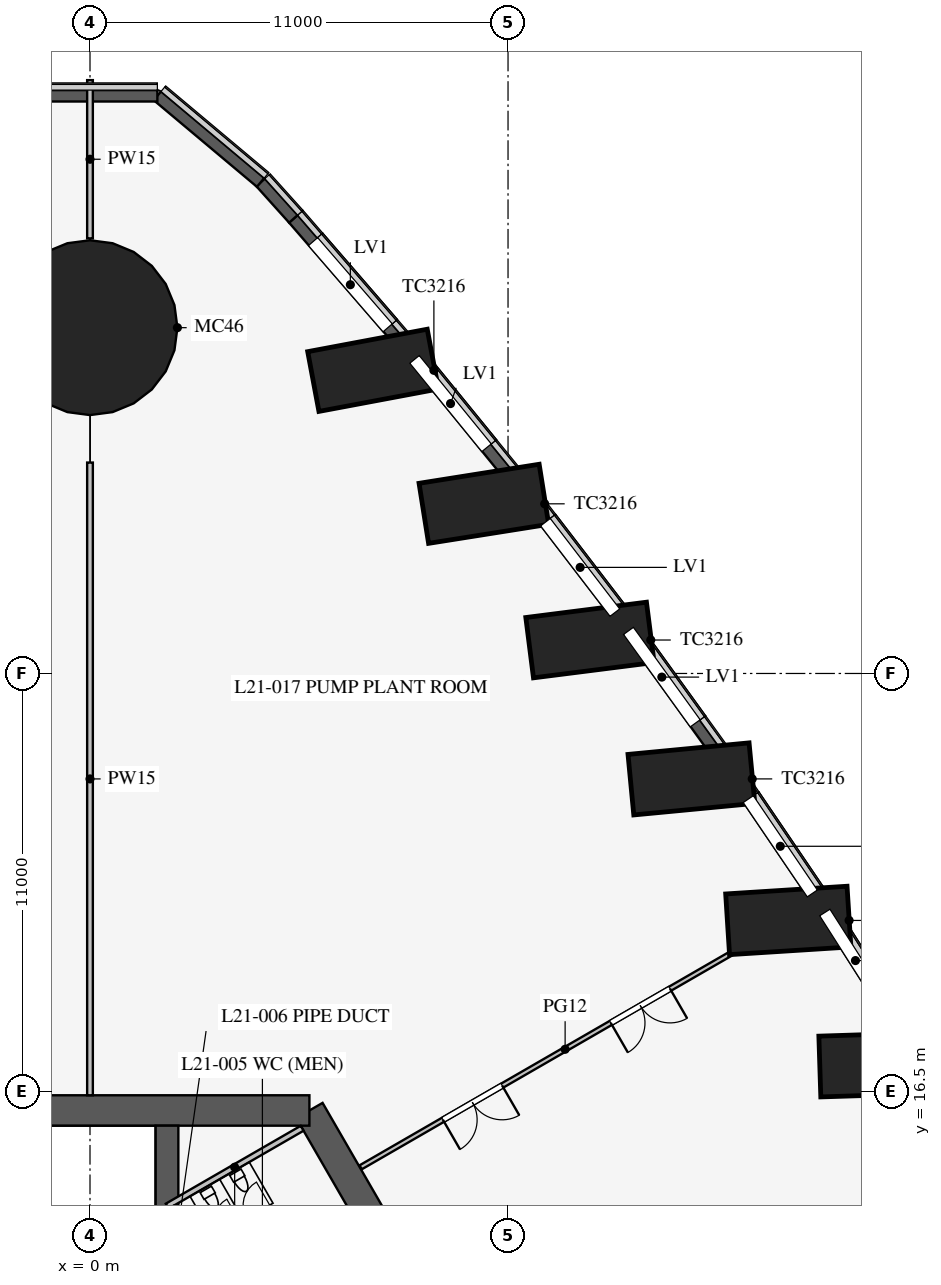
"""IFC4 building model, lengths in metres.
Left out: names, types, materials, properties, quantities, classifications, styles, units other than length and angle.
Written with IfcOpenShell. Run it as: python <this file> out.ifc"""

import sys

from ifc_helpers import new_model, si_unit, direction, frame, frame_2d, origin, origin_2d, place, context, subcontext, project, spatial, polyline, rectangle, circle, outline, extrude, clip, halfspace, element, fill, save


model = new_model("IFC4")
c1 = context("Model", 3, precision=1e-05, world=origin(), true_north=direction((0.0, 1.0)))
c2 = subcontext(c1, "Body", "Model", "MODEL_VIEW")
j1 = project(units=[si_unit("LENGTHUNIT", "METRE"), si_unit("PLANEANGLEUNIT", "RADIAN")], contexts=[c1])
p1 = place(None, origin())
s1 = spatial("IfcSite", under=j1, at=p1, CompositionType="ELEMENT")
p2 = place(p1, origin())
s2 = spatial("IfcBuilding", under=s1, at=p2, CompositionType="ELEMENT")
p3 = place(p2, frame((0.0, 0.0, 92.1)))
s3 = spatial("IfcBuildingStorey", under=s2, at=p3, CompositionType="ELEMENT", Elevation=92.1)
p4 = place(p3, frame((21.031, 17.339, 0.0), z_axis=(-0.185417945913, -0.107037626655, 0.976812741427), x_axis=(-0.526586350374, 0.850094417042, -0.006804242326)))
e1 = element("IfcColumn", 1, at=p4, inside=s3, PredefinedType="COLUMN", context=c2, shape_type="Clipping", body=[
    clip(clip(extrude(rectangle(XDim=3.2, YDim=1.6, at=origin_2d()), origin(), (0.0, 0.0, 1.0), 6.142), halfspace(frame((0.0, 0.0, 0.187), z_axis=(-1.1842135642686942e-05, -5.278007838949161e-06, 0.9999999999159532), x_axis=(0.0, 0.9999999999860714, 5.278007839319245e-06)), True)), halfspace(frame((0.0, 0.0, 5.955), z_axis=(1.1842135642686942e-05, 5.278007838949161e-06, -0.9999999999159532), x_axis=(0.0, -0.9999999999860714, -5.278007839319245e-06)), True)),
])
p5 = place(p3, frame((18.611, 21.137, 0.0), z_axis=(-0.191886340443, -0.110783015409, 0.975144479474), x_axis=(-0.552576194945, 0.833343769153, -0.014060981253)))
e2 = element("IfcColumn", 2, at=p5, inside=s3, PredefinedType="COLUMN", context=c2, shape_type="Clipping", body=[
    clip(clip(extrude(rectangle(XDim=3.2, YDim=1.6, at=origin_2d()), origin(), (0.0, 0.0, 1.0), 6.153), halfspace(frame((0.0, 0.0, 0.205), z_axis=(-3.711813696356814e-06, -2.269742593100088e-05, 0.9999999997355247), x_axis=(0.0, 0.9999999997424135, 2.269742593115724e-05)), True)), halfspace(frame((0.0, 0.0, 5.947), z_axis=(3.711813696356814e-06, 2.269742593100088e-05, -0.9999999997355247), x_axis=(0.0, -0.9999999997424135, -2.269742593115724e-05)), True)),
])
p6 = place(p3, frame((16.076, 24.87, 0.0), z_axis=(-0.20262976704, -0.116980910023, 0.972243099332), x_axis=(-0.577645682079, 0.81598540612, -0.022209974679)))
e3 = element("IfcColumn", 3, at=p6, inside=s3, PredefinedType="COLUMN", context=c2, shape_type="Clipping", body=[
    clip(clip(extrude(rectangle(XDim=3.2, YDim=1.6, at=origin_2d()), origin(), (0.0, 0.0, 1.0), 6.171), halfspace(frame((0.0, 0.0, 0.229), z_axis=(-6.6490654311614225e-06, -1.841628814169827e-06, 0.9999999999761991), x_axis=(0.0, 0.9999999999983042, 1.8416288142105364e-06)), True)), halfspace(frame((0.0, 0.0, 5.942), z_axis=(6.6490654311614225e-06, 1.841628814169827e-06, -0.9999999999761991), x_axis=(0.0, -0.9999999999983042, -1.8416288142105364e-06)), True)),
])
p7 = place(p3, frame((13.426, 28.536, 0.0), z_axis=(-0.217636836674, -0.125674836379, 0.967904976133), x_axis=(-0.601725651442, 0.798074459643, -0.031676446499)))
e4 = element("IfcColumn", 4, at=p7, inside=s3, PredefinedType="COLUMN", context=c2, shape_type="Clipping", body=[
    clip(clip(extrude(rectangle(XDim=3.2, YDim=1.6, at=origin_2d()), origin(), (0.0, 0.0, 1.0), 6.199), halfspace(frame((0.0, 0.0, 0.259), z_axis=(2.1942927783215323e-05, 2.0499894571701646e-05, 0.9999999995491311), x_axis=(0.0, 0.9999999997898772, -2.0499894576636914e-05)), True)), halfspace(frame((0.0, 0.0, 5.939), z_axis=(-2.1942927783215323e-05, -2.0499894571701646e-05, -0.9999999995491311), x_axis=(0.0, -0.9999999997898772, 2.0499894576636914e-05)), True)),
])
p8 = place(p3, frame((10.66, 32.135, 0.0), z_axis=(-0.236939319597, -0.136786078955, 0.961846831586), x_axis=(-0.624285377749, 0.780019899069, -0.042857020249)))
e5 = element("IfcColumn", 5, at=p8, inside=s3, PredefinedType="COLUMN", context=c2, shape_type="Clipping", body=[
    clip(clip(extrude(rectangle(XDim=3.2, YDim=1.6, at=origin_2d()), origin(), (0.0, 0.0, 1.0), 6.238), halfspace(frame((0.0, 0.0, 0.297), z_axis=(-6.818020812683623e-06, 1.7282144695263124e-05, 0.9999999998274212), x_axis=(0.0, 0.9999999998506638, -1.7282144695664807e-05)), True)), halfspace(frame((0.0, 0.0, 5.941), z_axis=(6.818020812683623e-06, -1.7282144695263124e-05, -0.9999999998274212), x_axis=(0.0, -0.9999999998506638, 1.7282144695664807e-05)), True)),
])
p9 = place(p3, frame((7.776, 35.667, 0.0), z_axis=(-0.260253003307, -0.150307169968, 0.953769431742), x_axis=(-0.643899329697, 0.763098944981, -0.055440539186)))
e6 = element("IfcColumn", 6, at=p9, inside=s3, PredefinedType="COLUMN", context=c2, shape_type="Clipping", body=[
    clip(clip(extrude(rectangle(XDim=3.2, YDim=1.6, at=origin_2d()), origin(), (0.0, 0.0, 1.0), 6.291), halfspace(frame((0.0, 0.0, 0.342), z_axis=(4.541465322707716e-05, 7.087809625216934e-06, 0.9999999989436362), x_axis=(0.0, 0.9999999999748815, -7.087809632526204e-06)), True)), halfspace(frame((0.0, 0.0, 5.949), z_axis=(-4.541465322707716e-05, -7.087809625216934e-06, -0.9999999989436362), x_axis=(0.0, -0.9999999999748815, 7.087809632526204e-06)), True)),
])
p10 = place(p3, frame((0.0, 37.0, 0.0), z_axis=(0.0, -0.316227766017, 0.948683298051), x_axis=(1.0, 0.0, 0.0)))
e7 = element("IfcColumn", 7, at=p10, inside=s3, PredefinedType="COLUMN", context=c2, shape_type="Clipping", body=[
    clip(clip(extrude(circle(Radius=2.3, at=origin_2d()), origin(), (0.0, 0.0, 1.0), 6.324), halfspace(frame((0.0, 0.0, 0.768), z_axis=(0.0, 0.0, 1.0), x_axis=(0.0, 1.0, 0.0)), True)), halfspace(frame((0.0, 0.0, 5.557), z_axis=(0.0, 0.0, -1.0), x_axis=(0.0, -1.0, 0.0)), True)),
])
p11 = place(p3, frame((16.743, -3.0, 0.0), z_axis=(0.0, 0.0, 1.0), x_axis=(-0.500002442456, 0.866023993627, 0.0)))
e8 = element("IfcWall", 8, at=p11, inside=s3, PredefinedType="SHEAR", context=c2, shape_type="SweptSolid", body=[
    extrude(rectangle(XDim=21.939, YDim=0.8, at=frame_2d((10.97, 0.0))), origin(), (0.0, 0.0, 1.0), 6.0),
])
p12 = place(p11, frame((17.27, 0.0, 0.0)))
e9 = element("IfcOpeningElement", 9, at=p12, cuts=e8, PredefinedType="OPENING", context=c2, shape_type="SweptSolid", body=[
    extrude(rectangle(XDim=1.2, YDim=2.1, at=frame_2d((0.6, 1.05))), frame((0.0, 0.41, 0.0), z_axis=(0.0, -1.0, 0.0), x_axis=(1.0, 0.0, 0.0)), (0.0, 0.0, 1.0), 0.82),
])
p13 = place(p11, frame((3.47, 0.0, 0.0)))
e10 = element("IfcOpeningElement", 10, at=p13, cuts=e8, PredefinedType="OPENING", context=c2, shape_type="SweptSolid", body=[
    extrude(rectangle(XDim=1.2, YDim=2.1, at=frame_2d((0.6, 1.05))), frame((0.0, 0.41, 0.0), z_axis=(0.0, -1.0, 0.0), x_axis=(1.0, 0.0, 0.0)), (0.0, 0.0, 1.0), 0.82),
])
p14 = place(p3, frame((5.773, 16.0, 0.0), z_axis=(0.0, 0.0, 1.0), x_axis=(-1.0, 0.0, 0.0)))
e11 = element("IfcWall", 11, at=p14, inside=s3, PredefinedType="SHEAR", context=c2, shape_type="SweptSolid", body=[
    extrude(rectangle(XDim=11.547, YDim=0.8, at=frame_2d((5.773, 0.0))), origin(), (0.0, 0.0, 1.0), 6.0),
])
p15 = place(p3, frame((2.025, 6.525, 0.0), z_axis=(0.0, 0.0, 1.0), x_axis=(0.0, 1.0, 0.0)))
e12 = element("IfcWall", 12, at=p15, inside=s3, PredefinedType="SHEAR", context=c2, shape_type="SweptSolid", body=[
    extrude(rectangle(XDim=9.075, YDim=0.6, at=frame_2d((4.538, 0.0))), origin(), (0.0, 0.0, 1.0), 6.0),
])
p16 = place(p3, frame((21.595, 17.664, 0.0), z_axis=(0.0, 0.0, 1.0), x_axis=(-0.537243691336, 0.843427066272, 0.0)))
e13 = element("IfcWall", 13, at=p16, inside=s3, PredefinedType="SOLIDWALL", context=c2, shape_type="SweptSolid", body=[
    extrude(rectangle(XDim=4.504, YDim=0.3, at=frame_2d((2.252, 0.0))), origin(), (0.0, 0.0, 1.0), 5.8),
])
p17 = place(p16, frame((1.204, 0.0, 3.5)))
e14 = element("IfcOpeningElement", 14, at=p17, cuts=e13, PredefinedType="OPENING", context=c2, shape_type="SweptSolid", body=[
    extrude(rectangle(XDim=3.0, YDim=2.0, at=frame_2d((1.5, 1.0))), frame((0.0, 0.16, 0.0), z_axis=(0.0, -1.0, 0.0), x_axis=(1.0, 0.0, 0.0)), (0.0, 0.0, 1.0), 0.32),
])
p18 = place(p3, frame((19.175, 21.463, 0.0), z_axis=(0.0, 0.0, 1.0), x_axis=(-0.561512004239, 0.827468591002, 0.0)))
e15 = element("IfcWall", 15, at=p18, inside=s3, PredefinedType="SOLIDWALL", context=c2, shape_type="SweptSolid", body=[
    extrude(rectangle(XDim=4.512, YDim=0.3, at=frame_2d((2.256, 0.0))), origin(), (0.0, 0.0, 1.0), 5.8),
])
p19 = place(p18, frame((0.3, 0.0, 3.5)))
e16 = element("IfcOpeningElement", 16, at=p19, cuts=e15, PredefinedType="OPENING", context=c2, shape_type="SweptSolid", body=[
    extrude(rectangle(XDim=3.0, YDim=2.0, at=frame_2d((1.5, 1.0))), frame((0.0, 0.16, 0.0), z_axis=(0.0, -1.0, 0.0), x_axis=(1.0, 0.0, 0.0)), (0.0, 0.0, 1.0), 0.32),
])
p20 = place(p3, frame((16.641, 25.196, 0.0), z_axis=(0.0, 0.0, 1.0), x_axis=(-0.585376255171, 0.810761765183, 0.0)))
e17 = element("IfcWall", 17, at=p20, inside=s3, PredefinedType="SOLIDWALL", context=c2, shape_type="SweptSolid", body=[
    extrude(rectangle(XDim=4.523, YDim=0.3, at=frame_2d((2.262, 0.0))), origin(), (0.0, 0.0, 1.0), 5.8),
])
p21 = place(p20, frame((1.223, 0.0, 3.5)))
e18 = element("IfcOpeningElement", 18, at=p21, cuts=e17, PredefinedType="OPENING", context=c2, shape_type="SweptSolid", body=[
    extrude(rectangle(XDim=3.0, YDim=2.0, at=frame_2d((1.5, 1.0))), frame((0.0, 0.16, 0.0), z_axis=(0.0, -1.0, 0.0), x_axis=(1.0, 0.0, 0.0)), (0.0, 0.0, 1.0), 0.32),
])
p22 = place(p3, frame((13.993, 28.864, 0.0), z_axis=(0.0, 0.0, 1.0), x_axis=(-0.608784932975, 0.79333530451, 0.0)))
e19 = element("IfcWall", 19, at=p22, inside=s3, PredefinedType="SOLIDWALL", context=c2, shape_type="SweptSolid", body=[
    extrude(rectangle(XDim=4.539, YDim=0.3, at=frame_2d((2.27, 0.0))), origin(), (0.0, 0.0, 1.0), 5.8),
])
p23 = place(p22, frame((0.3, 0.0, 3.5)))
e20 = element("IfcOpeningElement", 20, at=p23, cuts=e19, PredefinedType="OPENING", context=c2, shape_type="SweptSolid", body=[
    extrude(rectangle(XDim=3.0, YDim=2.0, at=frame_2d((1.5, 1.0))), frame((0.0, 0.16, 0.0), z_axis=(0.0, -1.0, 0.0), x_axis=(1.0, 0.0, 0.0)), (0.0, 0.0, 1.0), 0.32),
])
p24 = place(p3, frame((11.23, 32.465, 0.0), z_axis=(0.0, 0.0, 1.0), x_axis=(-0.631833879056, 0.775103831288, 0.0)))
e21 = element("IfcWall", 21, at=p24, inside=s3, PredefinedType="SOLIDWALL", context=c2, shape_type="SweptSolid", body=[
    extrude(rectangle(XDim=4.558, YDim=0.3, at=frame_2d((2.279, 0.0))), origin(), (0.0, 0.0, 1.0), 5.8),
])
p25 = place(p24, frame((1.259, 0.0, 3.5)))
e22 = element("IfcOpeningElement", 22, at=p25, cuts=e21, PredefinedType="OPENING", context=c2, shape_type="SweptSolid", body=[
    extrude(rectangle(XDim=3.0, YDim=2.0, at=frame_2d((1.5, 1.0))), frame((0.0, 0.16, 0.0), z_axis=(0.0, -1.0, 0.0), x_axis=(1.0, 0.0, 0.0)), (0.0, 0.0, 1.0), 0.32),
])
p26 = place(p3, frame((8.35, 35.998, 0.0), z_axis=(0.0, 0.0, 1.0), x_axis=(-0.654364441553, 0.756179329016, 0.0)))
e23 = element("IfcWall", 23, at=p26, inside=s3, PredefinedType="SOLIDWALL", context=c2, shape_type="SweptSolid", body=[
    extrude(rectangle(XDim=4.582, YDim=0.3, at=frame_2d((2.291, 0.0))), origin(), (0.0, 0.0, 1.0), 5.8),
])
p27 = place(p26, frame((0.791, 0.0, 3.5)))
e24 = element("IfcOpeningElement", 24, at=p27, cuts=e23, PredefinedType="OPENING", context=c2, shape_type="SweptSolid", body=[
    extrude(rectangle(XDim=3.0, YDim=2.0, at=frame_2d((1.5, 1.0))), frame((0.0, 0.16, 0.0), z_axis=(0.0, -1.0, 0.0), x_axis=(1.0, 0.0, 0.0)), (0.0, 0.0, 1.0), 0.32),
])
p28 = place(p3, frame((5.352, 39.463, 0.0), z_axis=(0.0, 0.0, 1.0), x_axis=(-0.668546439873, 0.743670395896, 0.0)))
e25 = element("IfcWall", 25, at=p28, inside=s3, PredefinedType="SOLIDWALL", context=c2, shape_type="SweptSolid", body=[
    extrude(rectangle(XDim=1.29, YDim=0.3, at=frame_2d((0.645, 0.0))), origin(), (0.0, 0.0, 1.0), 5.8),
])
p29 = place(p3, frame((4.489, 40.422, 0.0), z_axis=(0.0, 0.0, 1.0), x_axis=(-0.766072328399, 0.64275437584, 0.0)))
e26 = element("IfcWall", 26, at=p29, inside=s3, PredefinedType="SOLIDWALL", context=c2, shape_type="SweptSolid", body=[
    extrude(rectangle(XDim=3.546, YDim=0.3, at=frame_2d((1.773, 0.0))), origin(), (0.0, 0.0, 1.0), 5.8),
])
p30 = place(p3, frame((1.773, 42.701, 0.0), z_axis=(0.0, 0.0, 1.0), x_axis=(-1.0, 0.0, 0.0)))
e27 = element("IfcWall", 27, at=p30, inside=s3, PredefinedType="SOLIDWALL", context=c2, shape_type="SweptSolid", body=[
    extrude(rectangle(XDim=3.545, YDim=0.3, at=frame_2d((1.773, 0.0))), origin(), (0.0, 0.0, 1.0), 5.8),
])
p31 = place(p3, frame((2.031, 13.482, 0.0), z_axis=(0.0, 0.0, 1.0), x_axis=(0.866050731258, 0.499956128963, 0.0)))
e28 = element("IfcWall", 28, at=p31, inside=s3, PredefinedType="PARTITIONING", context=c2, shape_type="SweptSolid", body=[
    extrude(rectangle(XDim=4.1, YDim=0.15, at=frame_2d((2.05, 0.0))), origin(), (0.0, 0.0, 1.0), 5.8),
])
p32 = place(p3, frame((0.0, 16.4, 0.0), z_axis=(0.0, 0.0, 1.0), x_axis=(0.0, 1.0, 0.0)))
e29 = element("IfcWall", 29, at=p32, inside=s3, PredefinedType="PARTITIONING", context=c2, shape_type="SweptSolid", body=[
    extrude(rectangle(XDim=16.65, YDim=0.15, at=frame_2d((8.325, 0.0))), origin(), (0.0, 0.0, 1.0), 4.1),
])
p33 = place(p3, frame((0.0, 38.95, 0.0), z_axis=(0.0, 0.0, 1.0), x_axis=(0.0, 1.0, 0.0)))
e30 = element("IfcWall", 30, at=p33, inside=s3, PredefinedType="PARTITIONING", context=c2, shape_type="SweptSolid", body=[
    extrude(rectangle(XDim=4.164, YDim=0.15, at=frame_2d((2.082, 0.0))), origin(), (0.0, 0.0, 1.0), 4.1),
])
p34 = place(p3, frame((17.316, 20.39, 0.0), z_axis=(0.0, 0.0, 1.0), x_axis=(0.865911816314, 0.500196687681, 0.0)))
e31 = element("IfcWall", 31, at=p34, inside=s3, PredefinedType="PARTITIONING", context=c2, shape_type="SweptSolid", body=[
    extrude(outline(polyline([(0.0, 0.0), (0.654, 0.0), (0.653, 0.05), (0.0, 2.9), (0.0, 0.0)])), frame((0.0, 0.06, 0.0), z_axis=(0.0, -1.0, 0.0), x_axis=(1.0, 0.0, 0.0)), (0.0, 0.0, 1.0), 0.12),
])
p35 = place(p3, frame((7.122, 14.504, 0.0), z_axis=(0.0, 0.0, 1.0), x_axis=(0.866023947468, 0.500002522405, 0.0)))
e32 = element("IfcWall", 32, at=p35, inside=s3, PredefinedType="PARTITIONING", context=c2, shape_type="SweptSolid", body=[
    extrude(rectangle(XDim=11.771, YDim=0.12, at=frame_2d((5.886, 0.0))), origin(), (0.0, 0.0, 1.0), 2.9),
])
p36 = place(p35, frame((2.5, 0.0, 0.0)))
e33 = element("IfcOpeningElement", 33, at=p36, cuts=e32, PredefinedType="OPENING", context=c2, shape_type="SweptSolid", body=[
    extrude(rectangle(XDim=1.8, YDim=2.1, at=frame_2d((0.9, 1.05))), frame((0.0, 0.07, 0.0), z_axis=(0.0, -1.0, 0.0), x_axis=(1.0, 0.0, 0.0)), (0.0, 0.0, 1.0), 0.14),
])
p37 = place(p35, frame((7.6, 0.0, 0.0)))
e34 = element("IfcOpeningElement", 34, at=p37, cuts=e32, PredefinedType="OPENING", context=c2, shape_type="SweptSolid", body=[
    extrude(rectangle(XDim=1.8, YDim=2.1, at=frame_2d((0.9, 1.05))), frame((0.0, 0.07, 0.0), z_axis=(0.0, -1.0, 0.0), x_axis=(1.0, 0.0, 0.0)), (0.0, 0.0, 1.0), 0.14),
])
p38 = place(p17, origin())
e35 = element("IfcWindow", 35, at=p38, inside=s3, PartitioningType="SINGLE_PANEL", PredefinedType="USERDEFINED", context=c2, shape_type="SweptSolid", body=[
    extrude(rectangle(XDim=3.0, YDim=2.0, at=frame_2d((1.5, 1.0))), frame((0.0, 0.03, 0.0), z_axis=(0.0, -1.0, 0.0), x_axis=(1.0, 0.0, 0.0)), (0.0, 0.0, 1.0), 0.06),
])
fill(e14, e35)
p39 = place(p19, origin())
e36 = element("IfcWindow", 36, at=p39, inside=s3, PartitioningType="SINGLE_PANEL", PredefinedType="USERDEFINED", context=c2, shape_type="SweptSolid", body=[
    extrude(rectangle(XDim=3.0, YDim=2.0, at=frame_2d((1.5, 1.0))), frame((0.0, 0.03, 0.0), z_axis=(0.0, -1.0, 0.0), x_axis=(1.0, 0.0, 0.0)), (0.0, 0.0, 1.0), 0.06),
])
fill(e16, e36)
p40 = place(p21, origin())
e37 = element("IfcWindow", 37, at=p40, inside=s3, PartitioningType="SINGLE_PANEL", PredefinedType="USERDEFINED", context=c2, shape_type="SweptSolid", body=[
    extrude(rectangle(XDim=3.0, YDim=2.0, at=frame_2d((1.5, 1.0))), frame((0.0, 0.03, 0.0), z_axis=(0.0, -1.0, 0.0), x_axis=(1.0, 0.0, 0.0)), (0.0, 0.0, 1.0), 0.06),
])
fill(e18, e37)
p41 = place(p23, origin())
e38 = element("IfcWindow", 38, at=p41, inside=s3, PartitioningType="SINGLE_PANEL", PredefinedType="USERDEFINED", context=c2, shape_type="SweptSolid", body=[
    extrude(rectangle(XDim=3.0, YDim=2.0, at=frame_2d((1.5, 1.0))), frame((0.0, 0.03, 0.0), z_axis=(0.0, -1.0, 0.0), x_axis=(1.0, 0.0, 0.0)), (0.0, 0.0, 1.0), 0.06),
])
fill(e20, e38)
p42 = place(p25, origin())
e39 = element("IfcWindow", 39, at=p42, inside=s3, PartitioningType="SINGLE_PANEL", PredefinedType="USERDEFINED", context=c2, shape_type="SweptSolid", body=[
    extrude(rectangle(XDim=3.0, YDim=2.0, at=frame_2d((1.5, 1.0))), frame((0.0, 0.03, 0.0), z_axis=(0.0, -1.0, 0.0), x_axis=(1.0, 0.0, 0.0)), (0.0, 0.0, 1.0), 0.06),
])
fill(e22, e39)
p43 = place(p27, origin())
e40 = element("IfcWindow", 40, at=p43, inside=s3, PartitioningType="SINGLE_PANEL", PredefinedType="USERDEFINED", context=c2, shape_type="SweptSolid", body=[
    extrude(rectangle(XDim=3.0, YDim=2.0, at=frame_2d((1.5, 1.0))), frame((0.0, 0.03, 0.0), z_axis=(0.0, -1.0, 0.0), x_axis=(1.0, 0.0, 0.0)), (0.0, 0.0, 1.0), 0.06),
])
fill(e24, e40)
p44 = place(p36, frame((1.8, 0.0, 0.0), z_axis=(0.0, 0.0, 1.0), x_axis=(-1.0, 0.0, 0.0)))
e41 = element("IfcDoor", 41, at=p44, inside=s3, OperationType="DOUBLE_DOOR_SINGLE_SWING", PredefinedType="DOOR", context=c2, shape_type="SweptSolid", body=[
    extrude(rectangle(XDim=1.8, YDim=2.1, at=frame_2d((0.9, 1.05))), frame((0.0, 0.025, 0.0), z_axis=(0.0, -1.0, 0.0), x_axis=(1.0, 0.0, 0.0)), (0.0, 0.0, 1.0), 0.05),
])
fill(e33, e41)
p45 = place(p37, frame((1.8, 0.0, 0.0), z_axis=(0.0, 0.0, 1.0), x_axis=(-1.0, 0.0, 0.0)))
e42 = element("IfcDoor", 42, at=p45, inside=s3, OperationType="DOUBLE_DOOR_SINGLE_SWING", PredefinedType="DOOR", context=c2, shape_type="SweptSolid", body=[
    extrude(rectangle(XDim=1.8, YDim=2.1, at=frame_2d((0.9, 1.05))), frame((0.0, 0.025, 0.0), z_axis=(0.0, -1.0, 0.0), x_axis=(1.0, 0.0, 0.0)), (0.0, 0.0, 1.0), 0.05),
])
fill(e34, e42)
save(model, sys.argv[1])
